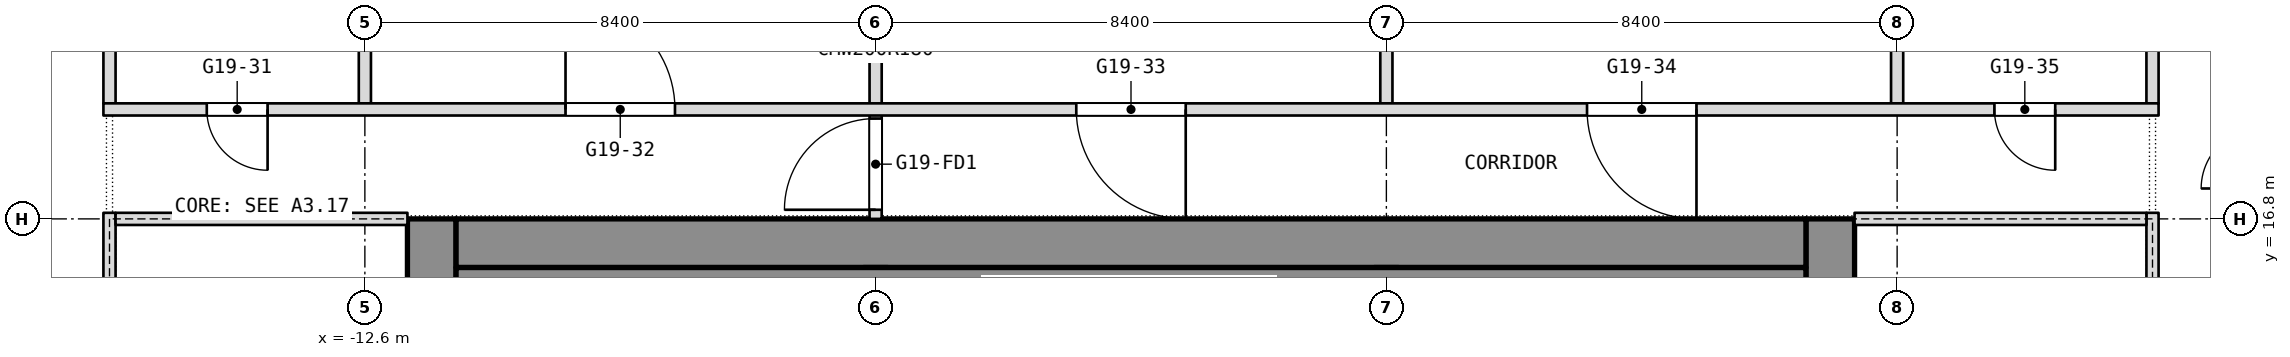
"""IFC4 building model, lengths in metres.
Left out: names, types, materials, properties, quantities, classifications, styles, units other than length and angle.
Written with IfcOpenShell. Run it as: python <this file> out.ifc"""

import sys

from ifc_helpers import new_model, si_unit, direction, frame, frame_2d, origin, place, context, subcontext, project, spatial, rectangle, extrude, element, fill, save


model = new_model("IFC4")
c1 = context("Model", 3, precision=1e-05, world=origin(), true_north=direction((0.0, 1.0)))
c2 = subcontext(c1, "Body", "Model", "MODEL_VIEW")
j1 = project(units=[si_unit("LENGTHUNIT", "METRE"), si_unit("PLANEANGLEUNIT", "RADIAN")], contexts=[c1])
p1 = place(None, origin())
s1 = spatial("IfcSite", under=j1, at=p1, CompositionType="ELEMENT")
p2 = place(p1, origin())
s2 = spatial("IfcBuilding", under=s1, at=p2, CompositionType="ELEMENT")
p3 = place(p2, frame((0.0, 0.0, 220.1)))
s3 = spatial("IfcBuildingStorey", under=s2, at=p3, CompositionType="ELEMENT", Elevation=220.1)
p4 = place(p3, frame((11.5, 0.0, 0.0), z_axis=(0.0, 0.0, 1.0), x_axis=(0.0, 1.0, 0.0)))
e1 = element("IfcWall", 1, at=p4, inside=s3, PredefinedType="SHEAR", context=c2, shape_type="SweptSolid", body=[
    extrude(rectangle(XDim=16.8, YDim=0.8, at=frame_2d((8.4, 0.0))), origin(), (0.0, 0.0, 1.0), 3.6),
])
p5 = place(p4, frame((2.3, 0.0, 0.0)))
e2 = element("IfcOpeningElement", 2, at=p5, cuts=e1, PredefinedType="OPENING", context=c2, shape_type="SweptSolid", body=[
    extrude(rectangle(XDim=1.1, YDim=2.1, at=frame_2d((0.55, 1.05))), frame((0.0, 0.4, 0.0), z_axis=(0.0, -1.0, 0.0), x_axis=(1.0, 0.0, 0.0)), (0.0, 0.0, 1.0), 0.8),
])
p6 = place(p4, frame((4.85, 0.0, 0.0)))
e3 = element("IfcOpeningElement", 3, at=p6, cuts=e1, PredefinedType="OPENING", context=c2, shape_type="SweptSolid", body=[
    extrude(rectangle(XDim=1.1, YDim=2.1, at=frame_2d((0.55, 1.05))), frame((0.0, 0.4, 0.0), z_axis=(0.0, -1.0, 0.0), x_axis=(1.0, 0.0, 0.0)), (0.0, 0.0, 1.0), 0.8),
])
p7 = place(p4, frame((6.825, 0.0, 0.0)))
e4 = element("IfcOpeningElement", 4, at=p7, cuts=e1, PredefinedType="OPENING", context=c2, shape_type="SweptSolid", body=[
    extrude(rectangle(XDim=1.2, YDim=2.1, at=frame_2d((0.6, 1.05))), frame((0.0, 0.4, 0.0), z_axis=(0.0, -1.0, 0.0), x_axis=(1.0, 0.0, 0.0)), (0.0, 0.0, 1.0), 0.8),
])
p8 = place(p4, frame((13.4, 0.0, 0.0)))
e5 = element("IfcOpeningElement", 5, at=p8, cuts=e1, PredefinedType="OPENING", context=c2, shape_type="SweptSolid", body=[
    extrude(rectangle(XDim=1.1, YDim=2.1, at=frame_2d((0.55, 1.05))), frame((0.0, 0.4, 0.0), z_axis=(0.0, -1.0, 0.0), x_axis=(1.0, 0.0, 0.0)), (0.0, 0.0, 1.0), 0.8),
])
p9 = place(p4, frame((10.85, 0.0, 0.0)))
e6 = element("IfcOpeningElement", 6, at=p9, cuts=e1, PredefinedType="OPENING", context=c2, shape_type="SweptSolid", body=[
    extrude(rectangle(XDim=1.1, YDim=2.1, at=frame_2d((0.55, 1.05))), frame((0.0, 0.4, 0.0), z_axis=(0.0, -1.0, 0.0), x_axis=(1.0, 0.0, 0.0)), (0.0, 0.0, 1.0), 0.8),
])
p10 = place(p4, frame((8.775, 0.0, 0.0)))
e7 = element("IfcOpeningElement", 7, at=p10, cuts=e1, PredefinedType="OPENING", context=c2, shape_type="SweptSolid", body=[
    extrude(rectangle(XDim=1.2, YDim=2.1, at=frame_2d((0.6, 1.05))), frame((0.0, 0.4, 0.0), z_axis=(0.0, -1.0, 0.0), x_axis=(1.0, 0.0, 0.0)), (0.0, 0.0, 1.0), 0.8),
])
p11 = place(p3, frame((-11.5, 0.0, 0.0), z_axis=(0.0, 0.0, 1.0), x_axis=(0.0, 1.0, 0.0)))
e8 = element("IfcWall", 8, at=p11, inside=s3, PredefinedType="SHEAR", context=c2, shape_type="SweptSolid", body=[
    extrude(rectangle(XDim=16.8, YDim=0.8, at=frame_2d((8.4, 0.0))), origin(), (0.0, 0.0, 1.0), 3.6),
])
p12 = place(p11, frame((3.6, 0.0, 0.0)))
e9 = element("IfcOpeningElement", 9, at=p12, cuts=e8, PredefinedType="OPENING", context=c2, shape_type="SweptSolid", body=[
    extrude(rectangle(XDim=0.9, YDim=2.1, at=frame_2d((0.45, 1.05))), frame((0.0, 0.4, 0.0), z_axis=(0.0, -1.0, 0.0), x_axis=(1.0, 0.0, 0.0)), (0.0, 0.0, 1.0), 0.8),
])
p13 = place(p11, frame((6.825, 0.0, 0.0)))
e10 = element("IfcOpeningElement", 10, at=p13, cuts=e8, PredefinedType="OPENING", context=c2, shape_type="SweptSolid", body=[
    extrude(rectangle(XDim=1.2, YDim=2.1, at=frame_2d((0.6, 1.05))), frame((0.0, 0.4, 0.0), z_axis=(0.0, -1.0, 0.0), x_axis=(1.0, 0.0, 0.0)), (0.0, 0.0, 1.0), 0.8),
])
p14 = place(p11, frame((12.3, 0.0, 0.0)))
e11 = element("IfcOpeningElement", 11, at=p14, cuts=e8, PredefinedType="OPENING", context=c2, shape_type="SweptSolid", body=[
    extrude(rectangle(XDim=0.9, YDim=2.1, at=frame_2d((0.45, 1.05))), frame((0.0, 0.4, 0.0), z_axis=(0.0, -1.0, 0.0), x_axis=(1.0, 0.0, 0.0)), (0.0, 0.0, 1.0), 0.8),
])
p15 = place(p11, frame((8.775, 0.0, 0.0)))
e12 = element("IfcOpeningElement", 12, at=p15, cuts=e8, PredefinedType="OPENING", context=c2, shape_type="SweptSolid", body=[
    extrude(rectangle(XDim=1.2, YDim=2.1, at=frame_2d((0.6, 1.05))), frame((0.0, 0.4, 0.0), z_axis=(0.0, -1.0, 0.0), x_axis=(1.0, 0.0, 0.0)), (0.0, 0.0, 1.0), 0.8),
])
p16 = place(p3, frame((-11.1, 16.4, 0.0), z_axis=(0.0, 0.0, 1.0), x_axis=(1.0, 0.0, 0.0)))
e13 = element("IfcWall", 13, at=p16, inside=s3, PredefinedType="SHEAR", context=c2, shape_type="SweptSolid", body=[
    extrude(rectangle(XDim=22.2, YDim=0.8, at=frame_2d((11.1, 0.0))), origin(), (0.0, 0.0, 1.0), 3.6),
])
p17 = place(p3, frame((-4.2, 0.8, 0.0), z_axis=(0.0, 0.0, 1.0), x_axis=(0.0, 1.0, 0.0)))
e14 = element("IfcWall", 14, at=p17, inside=s3, PredefinedType="SHEAR", context=c2, shape_type="SweptSolid", body=[
    extrude(rectangle(XDim=15.2, YDim=0.4, at=frame_2d((7.6, 0.0))), origin(), (0.0, 0.0, 1.0), 3.6),
])
p18 = place(p17, frame((8.5, 0.0, 0.0)))
e15 = element("IfcOpeningElement", 15, at=p18, cuts=e14, PredefinedType="OPENING", context=c2, shape_type="SweptSolid", body=[
    extrude(rectangle(XDim=1.2, YDim=2.1, at=frame_2d((0.6, 1.05))), frame((0.0, 0.2, 0.0), z_axis=(0.0, -1.0, 0.0), x_axis=(1.0, 0.0, 0.0)), (0.0, 0.0, 1.0), 0.4),
])
p19 = place(p3, frame((4.2, 0.8, 0.0), z_axis=(0.0, 0.0, 1.0), x_axis=(0.0, 1.0, 0.0)))
e16 = element("IfcWall", 16, at=p19, inside=s3, PredefinedType="SHEAR", context=c2, shape_type="SweptSolid", body=[
    extrude(rectangle(XDim=15.2, YDim=0.4, at=frame_2d((7.6, 0.0))), origin(), (0.0, 0.0, 1.0), 3.6),
])
p20 = place(p19, frame((5.95, 0.0, 0.0)))
e17 = element("IfcOpeningElement", 17, at=p20, cuts=e16, PredefinedType="OPENING", context=c2, shape_type="SweptSolid", body=[
    extrude(rectangle(XDim=1.2, YDim=2.1, at=frame_2d((0.6, 1.05))), frame((0.0, 0.2, 0.0), z_axis=(0.0, -1.0, 0.0), x_axis=(1.0, 0.0, 0.0)), (0.0, 0.0, 1.0), 0.4),
])
for number, where, z_axis, x_axis in (
    (18, (16.8, 18.7, 0.0), (0.0, 0.0, 1.0), (0.0, 1.0, 0.0)),
    (19, (12.6, 18.7, 0.0), (0.0, 0.0, 1.0), (0.0, 1.0, 0.0)),
    (20, (4.2, 18.7, 0.0), (0.0, 0.0, 1.0), (0.0, 1.0, 0.0)),
):
    element("IfcWall", number, at=place(p3, frame(where, z_axis=z_axis, x_axis=x_axis)), inside=s3, PredefinedType="PARTITIONING", context=c2, shape_type="SweptSolid", body=[
        extrude(rectangle(XDim=3.64, YDim=0.2, at=frame_2d((1.82, 0.0))), origin(), (0.0, 0.0, 1.0), 3.34),
    ])
p21 = place(p3, frame((-4.2, 16.8, 0.0), z_axis=(0.0, 0.0, 1.0), x_axis=(0.0, 1.0, 0.0)))
e21 = element("IfcWall", 21, at=p21, inside=s3, PredefinedType="PARTITIONING", context=c2, shape_type="SweptSolid", body=[
    extrude(rectangle(XDim=5.54, YDim=0.2, at=frame_2d((2.77, 0.0))), origin(), (0.0, 0.0, 1.0), 3.34),
])
p22 = place(p21, frame((0.15, 0.0, 0.0)))
e22 = element("IfcOpeningElement", 22, at=p22, cuts=e21, PredefinedType="OPENING", context=c2, shape_type="SweptSolid", body=[
    extrude(rectangle(XDim=1.5, YDim=2.1, at=frame_2d((0.75, 1.05))), frame((0.0, 0.1, 0.0), z_axis=(0.0, -1.0, 0.0), x_axis=(1.0, 0.0, 0.0)), (0.0, 0.0, 1.0), 0.2),
])
for number, where, z_axis, x_axis in (
    (23, (-12.6, 18.7, 0.0), (0.0, 0.0, 1.0), (0.0, 1.0, 0.0)),
    (24, (-16.8, 18.7, 0.0), (0.0, 0.0, 1.0), (0.0, 1.0, 0.0)),
):
    element("IfcWall", number, at=place(p3, frame(where, z_axis=z_axis, x_axis=x_axis)), inside=s3, PredefinedType="PARTITIONING", context=c2, shape_type="SweptSolid", body=[
        extrude(rectangle(XDim=3.64, YDim=0.2, at=frame_2d((1.82, 0.0))), origin(), (0.0, 0.0, 1.0), 3.34),
    ])
p23 = place(p3, frame((-16.9, 18.6, 0.0), z_axis=(0.0, 0.0, 1.0), x_axis=(1.0, 0.0, 0.0)))
e25 = element("IfcWall", 25, at=p23, inside=s3, PredefinedType="PARTITIONING", context=c2, shape_type="SweptSolid", body=[
    extrude(rectangle(XDim=33.8, YDim=0.2, at=frame_2d((16.9, 0.0))), origin(), (0.0, 0.0, 1.0), 3.34),
])
p24 = place(p23, frame((1.7, 0.0, 0.0)))
e26 = element("IfcOpeningElement", 26, at=p24, cuts=e25, PredefinedType="OPENING", context=c2, shape_type="SweptSolid", body=[
    extrude(rectangle(XDim=1.0, YDim=2.1, at=frame_2d((0.5, 1.05))), frame((0.0, 0.1, 0.0), z_axis=(0.0, -1.0, 0.0), x_axis=(1.0, 0.0, 0.0)), (0.0, 0.0, 1.0), 0.2),
])
p25 = place(p23, frame((7.6, 0.0, 0.0)))
e27 = element("IfcOpeningElement", 27, at=p25, cuts=e25, PredefinedType="OPENING", context=c2, shape_type="SweptSolid", body=[
    extrude(rectangle(XDim=1.8, YDim=2.1, at=frame_2d((0.9, 1.05))), frame((0.0, 0.1, 0.0), z_axis=(0.0, -1.0, 0.0), x_axis=(1.0, 0.0, 0.0)), (0.0, 0.0, 1.0), 0.2),
])
p26 = place(p23, frame((16.0, 0.0, 0.0)))
e28 = element("IfcOpeningElement", 28, at=p26, cuts=e25, PredefinedType="OPENING", context=c2, shape_type="SweptSolid", body=[
    extrude(rectangle(XDim=1.8, YDim=2.1, at=frame_2d((0.9, 1.05))), frame((0.0, 0.1, 0.0), z_axis=(0.0, -1.0, 0.0), x_axis=(1.0, 0.0, 0.0)), (0.0, 0.0, 1.0), 0.2),
])
p27 = place(p23, frame((24.4, 0.0, 0.0)))
e29 = element("IfcOpeningElement", 29, at=p27, cuts=e25, PredefinedType="OPENING", context=c2, shape_type="SweptSolid", body=[
    extrude(rectangle(XDim=1.8, YDim=2.1, at=frame_2d((0.9, 1.05))), frame((0.0, 0.1, 0.0), z_axis=(0.0, -1.0, 0.0), x_axis=(1.0, 0.0, 0.0)), (0.0, 0.0, 1.0), 0.2),
])
p28 = place(p23, frame((31.1, 0.0, 0.0)))
e30 = element("IfcOpeningElement", 30, at=p28, cuts=e25, PredefinedType="OPENING", context=c2, shape_type="SweptSolid", body=[
    extrude(rectangle(XDim=1.0, YDim=2.1, at=frame_2d((0.5, 1.05))), frame((0.0, 0.1, 0.0), z_axis=(0.0, -1.0, 0.0), x_axis=(1.0, 0.0, 0.0)), (0.0, 0.0, 1.0), 0.2),
])
p29 = place(p3, frame((-11.1, 15.65, 0.0), z_axis=(0.0, 0.0, 1.0), x_axis=(1.0, 0.0, 0.0)))
e31 = element("IfcWall", 31, at=p29, inside=s3, PredefinedType="PARTITIONING", context=c2, shape_type="SweptSolid", body=[
    extrude(rectangle(XDim=22.2, YDim=0.7, at=frame_2d((11.1, 0.0))), origin(), (0.0, 0.0, 1.0), 3.34),
])
p30 = place(p3, frame((-16.8, -0.1, 0.0), z_axis=(0.0, 0.0, 1.0), x_axis=(0.0, 1.0, 0.0)))
e32 = element("IfcWall", 32, at=p30, inside=s3, PredefinedType="PARTITIONING", context=c2, shape_type="SweptSolid", body=[
    extrude(rectangle(XDim=17.0, YDim=0.2, at=frame_2d((8.5, 0.0))), origin(), (0.0, 0.0, 1.0), 3.34),
])
p31 = place(p30, frame((2.2, 0.0, 0.0)))
e33 = element("IfcOpeningElement", 33, at=p31, cuts=e32, PredefinedType="OPENING", context=c2, shape_type="SweptSolid", body=[
    extrude(rectangle(XDim=1.8, YDim=2.1, at=frame_2d((0.9, 1.05))), frame((0.0, 0.1, 0.0), z_axis=(0.0, -1.0, 0.0), x_axis=(1.0, 0.0, 0.0)), (0.0, 0.0, 1.0), 0.2),
])
p32 = place(p30, frame((13.0, 0.0, 0.0)))
e34 = element("IfcOpeningElement", 34, at=p32, cuts=e32, PredefinedType="OPENING", context=c2, shape_type="SweptSolid", body=[
    extrude(rectangle(XDim=1.8, YDim=2.1, at=frame_2d((0.9, 1.05))), frame((0.0, 0.1, 0.0), z_axis=(0.0, -1.0, 0.0), x_axis=(1.0, 0.0, 0.0)), (0.0, 0.0, 1.0), 0.2),
])
p33 = place(p3, frame((-16.7, 16.8, 0.0), z_axis=(0.0, 0.0, 1.0), x_axis=(1.0, 0.0, 0.0)))
e35 = element("IfcWall", 35, at=p33, inside=s3, PredefinedType="PARTITIONING", context=c2, shape_type="SweptSolid", body=[
    extrude(rectangle(XDim=4.8, YDim=0.2, at=frame_2d((2.4, 0.0))), origin(), (0.0, 0.0, 1.0), 2.94),
])
p34 = place(p3, frame((16.8, -0.1, 0.0), z_axis=(0.0, 0.0, 1.0), x_axis=(0.0, 1.0, 0.0)))
e36 = element("IfcWall", 36, at=p34, inside=s3, PredefinedType="PARTITIONING", context=c2, shape_type="SweptSolid", body=[
    extrude(rectangle(XDim=17.0, YDim=0.2, at=frame_2d((8.5, 0.0))), origin(), (0.0, 0.0, 1.0), 3.34),
])
p35 = place(p34, frame((2.2, 0.0, 0.0)))
e37 = element("IfcOpeningElement", 37, at=p35, cuts=e36, PredefinedType="OPENING", context=c2, shape_type="SweptSolid", body=[
    extrude(rectangle(XDim=1.8, YDim=2.1, at=frame_2d((0.9, 1.05))), frame((0.0, 0.1, 0.0), z_axis=(0.0, -1.0, 0.0), x_axis=(1.0, 0.0, 0.0)), (0.0, 0.0, 1.0), 0.2),
])
p36 = place(p34, frame((13.0, 0.0, 0.0)))
e38 = element("IfcOpeningElement", 38, at=p36, cuts=e36, PredefinedType="OPENING", context=c2, shape_type="SweptSolid", body=[
    extrude(rectangle(XDim=1.8, YDim=2.1, at=frame_2d((0.9, 1.05))), frame((0.0, 0.1, 0.0), z_axis=(0.0, -1.0, 0.0), x_axis=(1.0, 0.0, 0.0)), (0.0, 0.0, 1.0), 0.2),
])
p37 = place(p3, frame((11.9, 16.8, 0.0), z_axis=(0.0, 0.0, 1.0), x_axis=(1.0, 0.0, 0.0)))
e39 = element("IfcWall", 39, at=p37, inside=s3, PredefinedType="PARTITIONING", context=c2, shape_type="SweptSolid", body=[
    extrude(rectangle(XDim=4.8, YDim=0.2, at=frame_2d((2.4, 0.0))), origin(), (0.0, 0.0, 1.0), 2.94),
])
p38 = place(p24, origin())
e40 = element("IfcDoor", 40, at=p38, inside=s3, OperationType="SINGLE_SWING_LEFT", PredefinedType="DOOR", context=c2, shape_type="SweptSolid", body=[
    extrude(rectangle(XDim=1.0, YDim=2.1, at=frame_2d((0.5, 1.05))), frame((0.0, 0.025, 0.0), z_axis=(0.0, -1.0, 0.0), x_axis=(1.0, 0.0, 0.0)), (0.0, 0.0, 1.0), 0.05),
])
fill(e26, e40)
p39 = place(p25, origin())
e41 = element("IfcDoor", 41, at=p39, inside=s3, OperationType="DOUBLE_DOOR_SINGLE_SWING", PredefinedType="DOOR", context=c2, shape_type="SweptSolid", body=[
    extrude(rectangle(XDim=1.8, YDim=2.1, at=frame_2d((0.9, 1.05))), frame((0.0, 0.025, 0.0), z_axis=(0.0, -1.0, 0.0), x_axis=(1.0, 0.0, 0.0)), (0.0, 0.0, 1.0), 0.05),
])
fill(e27, e41)
p40 = place(p26, origin())
e42 = element("IfcDoor", 42, at=p40, inside=s3, OperationType="DOUBLE_DOOR_SINGLE_SWING", PredefinedType="DOOR", context=c2, shape_type="SweptSolid", body=[
    extrude(rectangle(XDim=1.8, YDim=2.1, at=frame_2d((0.9, 1.05))), frame((0.0, 0.025, 0.0), z_axis=(0.0, -1.0, 0.0), x_axis=(1.0, 0.0, 0.0)), (0.0, 0.0, 1.0), 0.05),
])
fill(e28, e42)
p41 = place(p27, origin())
e43 = element("IfcDoor", 43, at=p41, inside=s3, OperationType="DOUBLE_DOOR_SINGLE_SWING", PredefinedType="DOOR", context=c2, shape_type="SweptSolid", body=[
    extrude(rectangle(XDim=1.8, YDim=2.1, at=frame_2d((0.9, 1.05))), frame((0.0, 0.025, 0.0), z_axis=(0.0, -1.0, 0.0), x_axis=(1.0, 0.0, 0.0)), (0.0, 0.0, 1.0), 0.05),
])
fill(e29, e43)
p42 = place(p28, origin())
e44 = element("IfcDoor", 44, at=p42, inside=s3, OperationType="SINGLE_SWING_LEFT", PredefinedType="DOOR", context=c2, shape_type="SweptSolid", body=[
    extrude(rectangle(XDim=1.0, YDim=2.1, at=frame_2d((0.5, 1.05))), frame((0.0, 0.025, 0.0), z_axis=(0.0, -1.0, 0.0), x_axis=(1.0, 0.0, 0.0)), (0.0, 0.0, 1.0), 0.05),
])
fill(e30, e44)
p43 = place(p22, origin())
e45 = element("IfcDoor", 45, at=p43, inside=s3, OperationType="DOUBLE_DOOR_DOUBLE_SWING", PredefinedType="DOOR", context=c2, shape_type="SweptSolid", body=[
    extrude(rectangle(XDim=1.5, YDim=2.1, at=frame_2d((0.75, 1.05))), frame((0.0, 0.025, 0.0), z_axis=(0.0, -1.0, 0.0), x_axis=(1.0, 0.0, 0.0)), (0.0, 0.0, 1.0), 0.05),
])
fill(e22, e45)
save(model, sys.argv[1])
